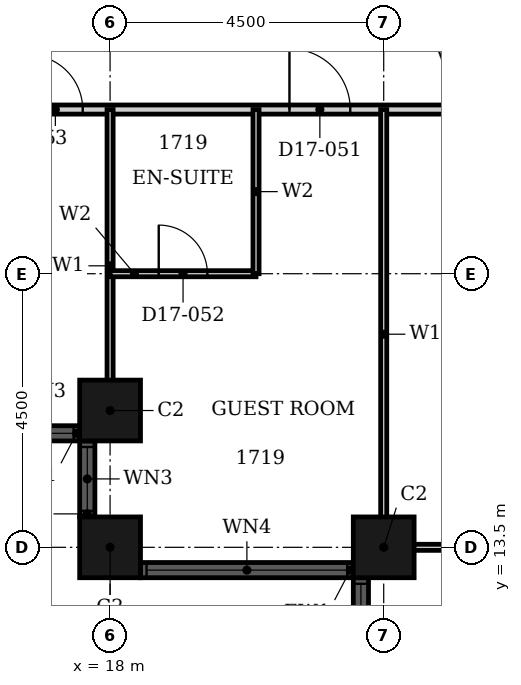
"""IFC4 building model, lengths in metres.
Left out: names, types, materials, properties, quantities, classifications, styles, units other than length and angle.
Written with IfcOpenShell. Run it as: python <this file> out.ifc"""

import sys

from ifc_helpers import new_model, si_unit, direction, frame, frame_2d, origin, origin_2d, place, context, subcontext, project, spatial, rectangle, hollow_rectangle, extrude, element, fill, save


model = new_model("IFC4")
c1 = context("Model", 3, precision=1e-05, world=origin(), true_north=direction((0.0, 1.0)))
c2 = subcontext(c1, "Body", "Model", "MODEL_VIEW")
j1 = project(units=[si_unit("LENGTHUNIT", "METRE"), si_unit("PLANEANGLEUNIT", "RADIAN")], contexts=[c1])
p1 = place(None, origin())
s1 = spatial("IfcSite", under=j1, at=p1, CompositionType="ELEMENT")
p2 = place(p1, origin())
s2 = spatial("IfcBuilding", under=s1, at=p2, CompositionType="ELEMENT")
p3 = place(p2, frame((0.0, 0.0, 74.4)))
s3 = spatial("IfcBuildingStorey", under=s2, at=p3, CompositionType="ELEMENT", Elevation=74.4)
for number, where, z_axis, x_axis in (
    (1, (18.0, 15.75, 0.0), (0.0, 0.0, 1.0), (1.0, 0.0, 0.0)),
    (2, (18.0, 13.5, 0.0), (0.0, 0.0, 1.0), (1.0, 0.0, 0.0)),
    (3, (22.5, 13.5, 0.0), (0.0, 0.0, 1.0), (1.0, 0.0, 0.0)),
):
    element("IfcColumn", number, at=place(p3, frame(where, z_axis=z_axis, x_axis=x_axis)), inside=s3, PredefinedType="COLUMN", context=c2, shape_type="SweptSolid", body=[
        extrude(hollow_rectangle(XDim=1.0, YDim=1.0, WallThickness=0.032, at=origin_2d()), origin(), (0.0, 0.0, 1.0), 3.6),
    ])
p4 = place(p3, frame((16.25, 15.375, 0.0), z_axis=(0.0, 0.0, 1.0), x_axis=(1.0, 0.0, 0.0)))
e4 = element("IfcWall", 4, at=p4, inside=s3, PredefinedType="SOLIDWALL", context=c2, shape_type="SweptSolid", body=[
    extrude(rectangle(XDim=1.25, YDim=0.25, at=frame_2d((0.625, 0.0))), origin(), (0.0, 0.0, 1.0), 3.6),
])
p5 = place(p4, frame((0.1, 0.0, 0.9)))
e5 = element("IfcOpeningElement", 5, at=p5, cuts=e4, PredefinedType="OPENING", context=c2, shape_type="SweptSolid", body=[
    extrude(rectangle(XDim=1.05, YDim=2.08, at=frame_2d((0.525, 1.04))), frame((0.0, 0.135, 0.0), z_axis=(0.0, -1.0, 0.0), x_axis=(1.0, 0.0, 0.0)), (0.0, 0.0, 1.0), 0.27),
])
p6 = place(p3, frame((17.625, 15.25, 0.0), z_axis=(0.0, 0.0, 1.0), x_axis=(0.0, -1.0, 0.0)))
e6 = element("IfcWall", 6, at=p6, inside=s3, PredefinedType="SOLIDWALL", context=c2, shape_type="SweptSolid", body=[
    extrude(rectangle(XDim=1.25, YDim=0.25, at=frame_2d((0.625, 0.0))), origin(), (0.0, 0.0, 1.0), 3.6),
])
p7 = place(p6, frame((0.1, 0.0, 0.9)))
e7 = element("IfcOpeningElement", 7, at=p7, cuts=e6, PredefinedType="OPENING", context=c2, shape_type="SweptSolid", body=[
    extrude(rectangle(XDim=1.05, YDim=2.08, at=frame_2d((0.525, 1.04))), frame((0.0, 0.135, 0.0), z_axis=(0.0, -1.0, 0.0), x_axis=(1.0, 0.0, 0.0)), (0.0, 0.0, 1.0), 0.27),
])
p8 = place(p3, frame((18.5, 13.125, 0.0), z_axis=(0.0, 0.0, 1.0), x_axis=(1.0, 0.0, 0.0)))
e8 = element("IfcWall", 8, at=p8, inside=s3, PredefinedType="SOLIDWALL", context=c2, shape_type="SweptSolid", body=[
    extrude(rectangle(XDim=3.5, YDim=0.25, at=frame_2d((1.75, 0.0))), origin(), (0.0, 0.0, 1.0), 3.6),
])
p9 = place(p8, frame((0.1, 0.0, 0.9)))
e9 = element("IfcOpeningElement", 9, at=p9, cuts=e8, PredefinedType="OPENING", context=c2, shape_type="SweptSolid", body=[
    extrude(rectangle(XDim=3.3, YDim=2.08, at=frame_2d((1.65, 1.04))), frame((0.0, 0.135, 0.0), z_axis=(0.0, -1.0, 0.0), x_axis=(1.0, 0.0, 0.0)), (0.0, 0.0, 1.0), 0.27),
])
p10 = place(p3, frame((22.125, 13.0, 0.0), z_axis=(0.0, 0.0, 1.0), x_axis=(0.0, -1.0, 0.0)))
e10 = element("IfcWall", 10, at=p10, inside=s3, PredefinedType="SOLIDWALL", context=c2, shape_type="SweptSolid", body=[
    extrude(rectangle(XDim=8.0, YDim=0.25, at=frame_2d((4.0, 0.0))), origin(), (0.0, 0.0, 1.0), 3.6),
])
p11 = place(p10, frame((0.1, 0.0, 0.9)))
e11 = element("IfcOpeningElement", 11, at=p11, cuts=e10, PredefinedType="OPENING", context=c2, shape_type="SweptSolid", body=[
    extrude(rectangle(XDim=3.3, YDim=2.08, at=frame_2d((1.65, 1.04))), frame((0.0, 0.135, 0.0), z_axis=(0.0, -1.0, 0.0), x_axis=(1.0, 0.0, 0.0)), (0.0, 0.0, 1.0), 0.27),
])
p12 = place(p10, frame((4.6, 0.0, 0.9)))
e12 = element("IfcOpeningElement", 12, at=p12, cuts=e10, PredefinedType="OPENING", context=c2, shape_type="SweptSolid", body=[
    extrude(rectangle(XDim=3.3, YDim=2.08, at=frame_2d((1.65, 1.04))), frame((0.0, 0.135, 0.0), z_axis=(0.0, -1.0, 0.0), x_axis=(1.0, 0.0, 0.0)), (0.0, 0.0, 1.0), 0.27),
])
p13 = place(p3, frame((16.2, 20.7, 0.0), z_axis=(0.0, 0.0, 1.0), x_axis=(1.0, 0.0, 0.0)))
e13 = element("IfcWall", 13, at=p13, inside=s3, PredefinedType="PARTITIONING", context=c2, shape_type="SweptSolid", body=[
    extrude(rectangle(XDim=13.5, YDim=0.15, at=frame_2d((6.75, 0.0))), origin(), (0.0, 0.0, 1.0), 3.3),
])
p14 = place(p13, frame((4.75, 0.0, 0.0)))
e14 = element("IfcOpeningElement", 14, at=p14, cuts=e13, PredefinedType="OPENING", context=c2, shape_type="SweptSolid", body=[
    extrude(rectangle(XDim=1.0, YDim=2.1, at=frame_2d((0.5, 1.05))), frame((0.0, 0.085, 0.0), z_axis=(0.0, -1.0, 0.0), x_axis=(1.0, 0.0, 0.0)), (0.0, 0.0, 1.0), 0.17),
])
p15 = place(p13, frame((0.45, 0.0, 0.0)))
e15 = element("IfcOpeningElement", 15, at=p15, cuts=e13, PredefinedType="OPENING", context=c2, shape_type="SweptSolid", body=[
    extrude(rectangle(XDim=0.9, YDim=2.1, at=frame_2d((0.45, 1.05))), frame((0.0, 0.085, 0.0), z_axis=(0.0, -1.0, 0.0), x_axis=(1.0, 0.0, 0.0)), (0.0, 0.0, 1.0), 0.17),
])
p16 = place(p13, frame((9.45, 0.0, 0.0)))
e16 = element("IfcOpeningElement", 16, at=p16, cuts=e13, PredefinedType="OPENING", context=c2, shape_type="SweptSolid", body=[
    extrude(rectangle(XDim=0.9, YDim=2.1, at=frame_2d((0.45, 1.05))), frame((0.0, 0.085, 0.0), z_axis=(0.0, -1.0, 0.0), x_axis=(1.0, 0.0, 0.0)), (0.0, 0.0, 1.0), 0.17),
])
p17 = place(p3, frame((22.31, 13.5, 0.0), z_axis=(0.0, 0.0, 1.0), x_axis=(1.0, 0.0, 0.0)))
e17 = element("IfcWall", 17, at=p17, inside=s3, PredefinedType="PARTITIONING", context=c2, shape_type="SweptSolid", body=[
    extrude(rectangle(XDim=7.39, YDim=0.1, at=frame_2d((3.695, 0.0))), origin(), (0.0, 0.0, 1.0), 2.38),
])
p18 = place(p3, frame((18.0, 15.56, 0.0), z_axis=(0.0, 0.0, 1.0), x_axis=(0.0, 1.0, 0.0)))
e18 = element("IfcWall", 18, at=p18, inside=s3, PredefinedType="PARTITIONING", context=c2, shape_type="SweptSolid", body=[
    extrude(rectangle(XDim=5.14, YDim=0.1, at=frame_2d((2.57, 0.0))), origin(), (0.0, 0.0, 1.0), 3.3),
])
p19 = place(p3, frame((22.5, 13.31, 0.0), z_axis=(0.0, 0.0, 1.0), x_axis=(0.0, 1.0, 0.0)))
e19 = element("IfcWall", 19, at=p19, inside=s3, PredefinedType="PARTITIONING", context=c2, shape_type="SweptSolid", body=[
    extrude(rectangle(XDim=7.39, YDim=0.1, at=frame_2d((3.695, 0.0))), origin(), (0.0, 0.0, 1.0), 3.3),
])
p20 = place(p3, frame((18.0, 18.0, 0.0), z_axis=(0.0, 0.0, 1.0), x_axis=(1.0, 0.0, 0.0)))
e20 = element("IfcWall", 20, at=p20, inside=s3, PredefinedType="PARTITIONING", context=c2, shape_type="SweptSolid", body=[
    extrude(rectangle(XDim=2.4, YDim=0.1, at=frame_2d((1.2, 0.0))), origin(), (0.0, 0.0, 1.0), 3.3),
])
p21 = place(p20, frame((0.8, 0.0, 0.0)))
e21 = element("IfcOpeningElement", 21, at=p21, cuts=e20, PredefinedType="OPENING", context=c2, shape_type="SweptSolid", body=[
    extrude(rectangle(XDim=0.8, YDim=2.1, at=frame_2d((0.4, 1.05))), frame((0.0, 0.06, 0.0), z_axis=(0.0, -1.0, 0.0), x_axis=(1.0, 0.0, 0.0)), (0.0, 0.0, 1.0), 0.12),
])
p22 = place(p3, frame((20.4, 18.0, 0.0), z_axis=(0.0, 0.0, 1.0), x_axis=(0.0, 1.0, 0.0)))
e22 = element("IfcWall", 22, at=p22, inside=s3, PredefinedType="PARTITIONING", context=c2, shape_type="SweptSolid", body=[
    extrude(rectangle(XDim=2.7, YDim=0.1, at=frame_2d((1.35, 0.0))), origin(), (0.0, 0.0, 1.0), 3.3),
])
p23 = place(p5, origin())
e23 = element("IfcWindow", 23, at=p23, inside=s3, PartitioningType="SINGLE_PANEL", PredefinedType="WINDOW", context=c2, shape_type="SweptSolid", body=[
    extrude(rectangle(XDim=1.05, YDim=2.08, at=frame_2d((0.525, 1.04))), frame((0.0, 0.03, 0.0), z_axis=(0.0, -1.0, 0.0), x_axis=(1.0, 0.0, 0.0)), (0.0, 0.0, 1.0), 0.06),
])
fill(e5, e23)
p24 = place(p7, origin())
e24 = element("IfcWindow", 24, at=p24, inside=s3, PartitioningType="SINGLE_PANEL", PredefinedType="WINDOW", context=c2, shape_type="SweptSolid", body=[
    extrude(rectangle(XDim=1.05, YDim=2.08, at=frame_2d((0.525, 1.04))), frame((0.0, 0.03, 0.0), z_axis=(0.0, -1.0, 0.0), x_axis=(1.0, 0.0, 0.0)), (0.0, 0.0, 1.0), 0.06),
])
fill(e7, e24)
p25 = place(p9, origin())
e25 = element("IfcWindow", 25, at=p25, inside=s3, PartitioningType="SINGLE_PANEL", PredefinedType="WINDOW", context=c2, shape_type="SweptSolid", body=[
    extrude(rectangle(XDim=3.3, YDim=2.08, at=frame_2d((1.65, 1.04))), frame((0.0, 0.03, 0.0), z_axis=(0.0, -1.0, 0.0), x_axis=(1.0, 0.0, 0.0)), (0.0, 0.0, 1.0), 0.06),
])
fill(e9, e25)
p26 = place(p11, origin())
e26 = element("IfcWindow", 26, at=p26, inside=s3, PartitioningType="SINGLE_PANEL", PredefinedType="WINDOW", context=c2, shape_type="SweptSolid", body=[
    extrude(rectangle(XDim=3.3, YDim=2.08, at=frame_2d((1.65, 1.04))), frame((0.0, 0.03, 0.0), z_axis=(0.0, -1.0, 0.0), x_axis=(1.0, 0.0, 0.0)), (0.0, 0.0, 1.0), 0.06),
])
fill(e11, e26)
p27 = place(p14, origin())
e27 = element("IfcDoor", 27, at=p27, inside=s3, OperationType="SINGLE_SWING_RIGHT", PredefinedType="DOOR", context=c2, shape_type="SweptSolid", body=[
    extrude(rectangle(XDim=1.0, YDim=2.1, at=frame_2d((0.5, 1.05))), frame((0.0, 0.025, 0.0), z_axis=(0.0, -1.0, 0.0), x_axis=(1.0, 0.0, 0.0)), (0.0, 0.0, 1.0), 0.05),
])
fill(e14, e27)
p28 = place(p21, origin())
e28 = element("IfcDoor", 28, at=p28, inside=s3, OperationType="SINGLE_SWING_LEFT", PredefinedType="DOOR", context=c2, shape_type="SweptSolid", body=[
    extrude(rectangle(XDim=0.8, YDim=2.1, at=frame_2d((0.4, 1.05))), frame((0.0, 0.025, 0.0), z_axis=(0.0, -1.0, 0.0), x_axis=(1.0, 0.0, 0.0)), (0.0, 0.0, 1.0), 0.05),
])
fill(e21, e28)
p29 = place(p15, origin())
e29 = element("IfcDoor", 29, at=p29, inside=s3, OperationType="SINGLE_SWING_RIGHT", PredefinedType="DOOR", context=c2, shape_type="SweptSolid", body=[
    extrude(rectangle(XDim=0.9, YDim=2.1, at=frame_2d((0.45, 1.05))), frame((0.0, 0.025, 0.0), z_axis=(0.0, -1.0, 0.0), x_axis=(1.0, 0.0, 0.0)), (0.0, 0.0, 1.0), 0.05),
])
fill(e15, e29)
save(model, sys.argv[1])
